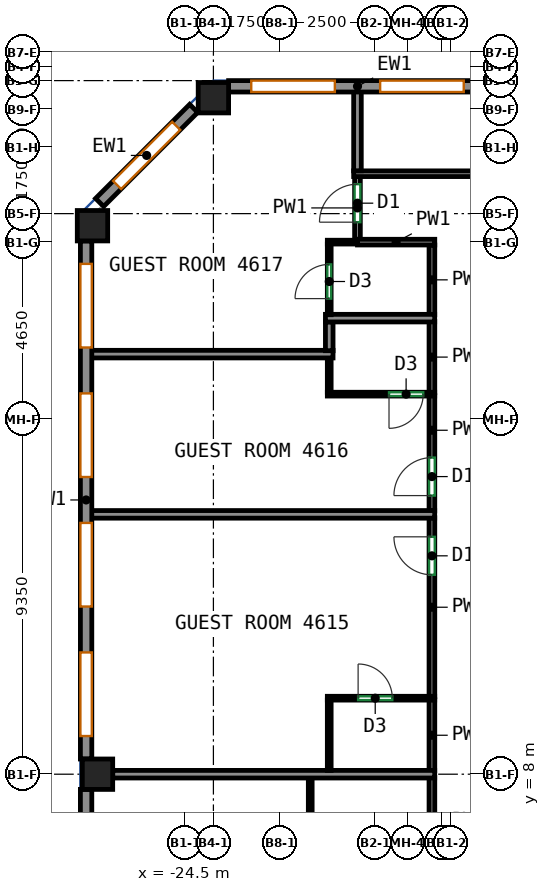
"""IFC4 building model, lengths in metres.
Left out: names, types, materials, properties, quantities, classifications, styles, units other than length and angle.
Written with IfcOpenShell. Run it as: python <this file> out.ifc"""

import sys

from ifc_helpers import new_model, si_unit, direction, frame, frame_2d, origin, origin_2d, place, context, subcontext, project, spatial, rectangle, extrude, source, transform, mapped, element, fill, save


model = new_model("IFC4")
c1 = context("Model", 3, precision=1e-05, world=origin(), true_north=direction((0.0, 1.0)))
c2 = subcontext(c1, "Body", "Model", "MODEL_VIEW")
j1 = project(units=[si_unit("LENGTHUNIT", "METRE"), si_unit("PLANEANGLEUNIT", "RADIAN")], contexts=[c1])
p1 = place(None, origin())
s1 = spatial("IfcSite", under=j1, at=p1, CompositionType="ELEMENT")
p2 = place(p1, origin())
s2 = spatial("IfcBuilding", under=s1, at=p2, CompositionType="ELEMENT")
p3 = place(p2, frame((0.0, 0.0, 192.3)))
s3 = spatial("IfcBuildingStorey", under=s2, at=p3, CompositionType="ELEMENT", Elevation=192.3)
m1 = source(origin(), c2, "Body", "SweptSolid", [
    extrude(rectangle(XDim=0.8, YDim=0.8, at=origin_2d()), origin(), (0.0, 0.0, 1.0), 3.0),
])
for number, where, z_axis, x_axis in (
    (1, (-26.932, 22.432, 0.0), (0.0, 0.0, 1.0), (1.0, 0.0, 0.0)),
    (2, (-26.8, 8.0, 0.0), (0.0, 0.0, 1.0), (1.0, 0.0, 0.0)),
    (3, (-23.75, 25.8, 0.0), (0.0, 0.0, 1.0), (1.0, 0.0, 0.0)),
):
    element("IfcColumn", number, at=place(p3, frame(where, z_axis=z_axis, x_axis=x_axis)), inside=s3, PredefinedType="COLUMN", context=c2, shape_type="MappedRepresentation", body=[
        mapped(m1, transform((0.0, 0.0, 0.0))),
    ])
m2 = source(origin(), c2, "Body", "SweptSolid", [
    extrude(rectangle(XDim=6.783, YDim=0.3, at=frame_2d((3.392, 0.0))), origin(), (0.0, 0.0, 1.0), 3.0),
])
p4 = place(p3, frame((-16.567, 26.1, 0.0), z_axis=(0.0, 0.0, 1.0), x_axis=(-1.0, 0.0, 0.0)))
e4 = element("IfcWall", 4, at=p4, inside=s3, PredefinedType="SOLIDWALL", context=c2, shape_type="MappedRepresentation", body=[
    mapped(m2, transform((0.0, 0.0, 0.0))),
])
p5 = place(p4, frame((0.596, 0.0, 0.85)))
e5 = element("IfcOpeningElement", 5, at=p5, cuts=e4, PredefinedType="OPENING", context=c2, shape_type="SweptSolid", body=[
    extrude(rectangle(XDim=2.2, YDim=1.95, at=frame_2d((1.1, 0.975))), frame((0.0, 0.16, 0.0), z_axis=(0.0, -1.0, 0.0), x_axis=(1.0, 0.0, 0.0)), (0.0, 0.0, 1.0), 0.32),
])
p6 = place(p4, frame((3.988, 0.0, 0.85)))
e6 = element("IfcOpeningElement", 6, at=p6, cuts=e4, PredefinedType="OPENING", context=c2, shape_type="SweptSolid", body=[
    extrude(rectangle(XDim=2.2, YDim=1.95, at=frame_2d((1.1, 0.975))), frame((0.0, 0.16, 0.0), z_axis=(0.0, -1.0, 0.0), x_axis=(1.0, 0.0, 0.0)), (0.0, 0.0, 1.0), 0.32),
])
m3 = source(origin(), c2, "Body", "SweptSolid", [
    extrude(rectangle(XDim=3.5, YDim=0.3, at=frame_2d((1.75, 0.0))), origin(), (0.0, 0.0, 1.0), 3.0),
])
p7 = place(p3, frame((-24.269, 25.519, 0.0), z_axis=(0.0, 0.0, 1.0), x_axis=(-0.707141656123, -0.70707190453, 0.0)))
e7 = element("IfcWall", 7, at=p7, inside=s3, PredefinedType="SOLIDWALL", context=c2, shape_type="MappedRepresentation", body=[
    mapped(m3, transform((0.0, 0.0, 0.0))),
])
p8 = place(p7, frame((0.65, 0.0, 0.85)))
e8 = element("IfcOpeningElement", 8, at=p8, cuts=e7, PredefinedType="OPENING", context=c2, shape_type="SweptSolid", body=[
    extrude(rectangle(XDim=2.2, YDim=1.95, at=frame_2d((1.1, 0.975))), frame((0.0, 0.16, 0.0), z_axis=(0.0, -1.0, 0.0), x_axis=(1.0, 0.0, 0.0)), (0.0, 0.0, 1.0), 0.32),
])
m4 = source(origin(), c2, "Body", "SweptSolid", [
    extrude(rectangle(XDim=13.632, YDim=0.3, at=frame_2d((6.816, 0.0))), origin(), (0.0, 0.0, 1.0), 3.0),
])
p9 = place(p3, frame((-27.1, 22.032, 0.0), z_axis=(0.0, 0.0, 1.0), x_axis=(0.0, -1.0, 0.0)))
e9 = element("IfcWall", 9, at=p9, inside=s3, PredefinedType="SOLIDWALL", context=c2, shape_type="MappedRepresentation", body=[
    mapped(m4, transform((0.0, 0.0, 0.0))),
])
p10 = place(p9, frame((0.604, 0.0, 0.85)))
e10 = element("IfcOpeningElement", 10, at=p10, cuts=e9, PredefinedType="OPENING", context=c2, shape_type="SweptSolid", body=[
    extrude(rectangle(XDim=2.2, YDim=1.95, at=frame_2d((1.1, 0.975))), frame((0.0, 0.16, 0.0), z_axis=(0.0, -1.0, 0.0), x_axis=(1.0, 0.0, 0.0)), (0.0, 0.0, 1.0), 0.32),
])
p11 = place(p9, frame((4.012, 0.0, 0.85)))
e11 = element("IfcOpeningElement", 11, at=p11, cuts=e9, PredefinedType="OPENING", context=c2, shape_type="SweptSolid", body=[
    extrude(rectangle(XDim=2.2, YDim=1.95, at=frame_2d((1.1, 0.975))), frame((0.0, 0.16, 0.0), z_axis=(0.0, -1.0, 0.0), x_axis=(1.0, 0.0, 0.0)), (0.0, 0.0, 1.0), 0.32),
])
p12 = place(p9, frame((7.42, 0.0, 0.85)))
e12 = element("IfcOpeningElement", 12, at=p12, cuts=e9, PredefinedType="OPENING", context=c2, shape_type="SweptSolid", body=[
    extrude(rectangle(XDim=2.2, YDim=1.95, at=frame_2d((1.1, 0.975))), frame((0.0, 0.16, 0.0), z_axis=(0.0, -1.0, 0.0), x_axis=(1.0, 0.0, 0.0)), (0.0, 0.0, 1.0), 0.32),
])
p13 = place(p9, frame((10.828, 0.0, 0.85)))
e13 = element("IfcOpeningElement", 13, at=p13, cuts=e9, PredefinedType="OPENING", context=c2, shape_type="SweptSolid", body=[
    extrude(rectangle(XDim=2.2, YDim=1.95, at=frame_2d((1.1, 0.975))), frame((0.0, 0.16, 0.0), z_axis=(0.0, -1.0, 0.0), x_axis=(1.0, 0.0, 0.0)), (0.0, 0.0, 1.0), 0.32),
])
m5 = source(origin(), c2, "Body", "SweptSolid", [
    extrude(rectangle(XDim=7.763, YDim=0.3, at=frame_2d((3.881, 0.0))), origin(), (0.0, 0.0, 1.0), 3.0),
])
p14 = place(p3, frame((-27.1, 7.6, 0.0), z_axis=(0.0, 0.0, 1.0), x_axis=(0.0, -1.0, 0.0)))
e14 = element("IfcWall", 14, at=p14, inside=s3, PredefinedType="SOLIDWALL", context=c2, shape_type="MappedRepresentation", body=[
    mapped(m5, transform((0.0, 0.0, 0.0))),
])
p15 = place(p14, frame((0.841, 0.0, 0.85)))
e15 = element("IfcOpeningElement", 15, at=p15, cuts=e14, PredefinedType="OPENING", context=c2, shape_type="SweptSolid", body=[
    extrude(rectangle(XDim=2.2, YDim=1.95, at=frame_2d((1.1, 0.975))), frame((0.0, 0.16, 0.0), z_axis=(0.0, -1.0, 0.0), x_axis=(1.0, 0.0, 0.0)), (0.0, 0.0, 1.0), 0.32),
])
p16 = place(p14, frame((4.722, 0.0, 0.85)))
e16 = element("IfcOpeningElement", 16, at=p16, cuts=e14, PredefinedType="OPENING", context=c2, shape_type="SweptSolid", body=[
    extrude(rectangle(XDim=2.2, YDim=1.95, at=frame_2d((1.1, 0.975))), frame((0.0, 0.16, 0.0), z_axis=(0.0, -1.0, 0.0), x_axis=(1.0, 0.0, 0.0)), (0.0, 0.0, 1.0), 0.32),
])
p17 = place(p3, frame((-18.0, 5.64, 0.0), z_axis=(0.0, 0.0, 1.0), x_axis=(0.0, 1.0, 0.0)))
e17 = element("IfcWall", 17, at=p17, inside=s3, PredefinedType="PARTITIONING", context=c2, shape_type="SweptSolid", body=[
    extrude(rectangle(XDim=2.27, YDim=0.15, at=frame_2d((1.135, 0.0))), origin(), (0.0, 0.0, 1.0), 3.0),
])
p18 = place(p3, frame((-18.0, 10.04, 0.0), z_axis=(0.0, 0.0, 1.0), x_axis=(0.0, 1.0, 0.0)))
e18 = element("IfcWall", 18, at=p18, inside=s3, PredefinedType="PARTITIONING", context=c2, shape_type="SweptSolid", body=[
    extrude(rectangle(XDim=4.707, YDim=0.15, at=frame_2d((2.354, 0.0))), origin(), (0.0, 0.0, 1.0), 3.0),
])
p19 = place(p18, frame((3.206, 0.0, 0.0)))
e19 = element("IfcOpeningElement", 19, at=p19, cuts=e18, PredefinedType="OPENING", context=c2, shape_type="SweptSolid", body=[
    extrude(rectangle(XDim=1.0, YDim=2.1, at=frame_2d((0.5, 1.05))), frame((0.0, 0.085, 0.0), z_axis=(0.0, -1.0, 0.0), x_axis=(1.0, 0.0, 0.0)), (0.0, 0.0, 1.0), 0.17),
])
p20 = place(p3, frame((-18.0, 8.09, 0.0), z_axis=(0.0, 0.0, 1.0), x_axis=(0.0, 1.0, 0.0)))
e20 = element("IfcWall", 20, at=p20, inside=s3, PredefinedType="PARTITIONING", context=c2, shape_type="SweptSolid", body=[
    extrude(rectangle(XDim=1.87, YDim=0.15, at=frame_2d((0.935, 0.0))), origin(), (0.0, 0.0, 1.0), 3.0),
])
p21 = place(p3, frame((-18.0, 14.927, 0.0), z_axis=(0.0, 0.0, 1.0), x_axis=(0.0, 1.0, 0.0)))
e21 = element("IfcWall", 21, at=p21, inside=s3, PredefinedType="PARTITIONING", context=c2, shape_type="SweptSolid", body=[
    extrude(rectangle(XDim=3.033, YDim=0.15, at=frame_2d((1.517, 0.0))), origin(), (0.0, 0.0, 1.0), 3.0),
])
p22 = place(p21, frame((0.404, 0.0, 0.0)))
e22 = element("IfcOpeningElement", 22, at=p22, cuts=e21, PredefinedType="OPENING", context=c2, shape_type="SweptSolid", body=[
    extrude(rectangle(XDim=1.0, YDim=2.1, at=frame_2d((0.5, 1.05))), frame((0.0, 0.085, 0.0), z_axis=(0.0, -1.0, 0.0), x_axis=(1.0, 0.0, 0.0)), (0.0, 0.0, 1.0), 0.17),
])
p23 = place(p3, frame((-18.0, 18.04, 0.0), z_axis=(0.0, 0.0, 1.0), x_axis=(0.0, 1.0, 0.0)))
e23 = element("IfcWall", 23, at=p23, inside=s3, PredefinedType="PARTITIONING", context=c2, shape_type="SweptSolid", body=[
    extrude(rectangle(XDim=1.87, YDim=0.15, at=frame_2d((0.935, 0.0))), origin(), (0.0, 0.0, 1.0), 3.0),
])
p24 = place(p3, frame((-19.959, 22.075, 0.0), z_axis=(0.0, 0.0, 1.0), x_axis=(0.0, 1.0, 0.0)))
e24 = element("IfcWall", 24, at=p24, inside=s3, PredefinedType="PARTITIONING", context=c2, shape_type="SweptSolid", body=[
    extrude(rectangle(XDim=1.65, YDim=0.15, at=frame_2d((0.825, 0.0))), origin(), (0.0, 0.0, 1.0), 3.0),
])
p25 = place(p24, frame((0.45, 0.0, 0.0)))
e25 = element("IfcOpeningElement", 25, at=p25, cuts=e24, PredefinedType="OPENING", context=c2, shape_type="SweptSolid", body=[
    extrude(rectangle(XDim=1.0, YDim=2.1, at=frame_2d((0.5, 1.05))), frame((0.0, 0.085, 0.0), z_axis=(0.0, -1.0, 0.0), x_axis=(1.0, 0.0, 0.0)), (0.0, 0.0, 1.0), 0.17),
])
p26 = place(p3, frame((-18.0, 20.09, 0.0), z_axis=(0.0, 0.0, 1.0), x_axis=(0.0, 1.0, 0.0)))
e26 = element("IfcWall", 26, at=p26, inside=s3, PredefinedType="PARTITIONING", context=c2, shape_type="SweptSolid", body=[
    extrude(rectangle(XDim=1.835, YDim=0.15, at=frame_2d((0.917, 0.0))), origin(), (0.0, 0.0, 1.0), 3.0),
])
p27 = place(p3, frame((-19.959, 22.0, 0.0), z_axis=(0.0, 0.0, 1.0), x_axis=(1.0, 0.0, 0.0)))
e27 = element("IfcWall", 27, at=p27, inside=s3, PredefinedType="PARTITIONING", context=c2, shape_type="SweptSolid", body=[
    extrude(rectangle(XDim=2.034, YDim=0.15, at=frame_2d((1.017, 0.0))), origin(), (0.0, 0.0, 1.0), 3.0),
])
p28 = place(p3, frame((-20.059, 23.8, 0.0), z_axis=(0.0, 0.0, 1.0), x_axis=(1.0, 0.0, 0.0)))
e28 = element("IfcWall", 28, at=p28, inside=s3, PredefinedType="PARTITIONING", context=c2, shape_type="SweptSolid", body=[
    extrude(rectangle(XDim=41.909, YDim=0.15, at=frame_2d((20.955, 0.0))), origin(), (0.0, 0.0, 1.0), 3.0),
])
p29 = place(p28, frame((4.718, 0.0, 0.0)))
e29 = element("IfcOpeningElement", 29, at=p29, cuts=e28, PredefinedType="OPENING", context=c2, shape_type="SweptSolid", body=[
    extrude(rectangle(XDim=0.9, YDim=2.1, at=frame_2d((0.45, 1.05))), frame((0.0, 0.085, 0.0), z_axis=(0.0, -1.0, 0.0), x_axis=(1.0, 0.0, 0.0)), (0.0, 0.0, 1.0), 0.17),
])
p30 = place(p28, frame((30.079, 0.0, 0.0)))
e30 = element("IfcOpeningElement", 30, at=p30, cuts=e28, PredefinedType="OPENING", context=c2, shape_type="SweptSolid", body=[
    extrude(rectangle(XDim=1.0, YDim=2.1, at=frame_2d((0.5, 1.05))), frame((0.0, 0.085, 0.0), z_axis=(0.0, -1.0, 0.0), x_axis=(1.0, 0.0, 0.0)), (0.0, 0.0, 1.0), 0.17),
])
p31 = place(p3, frame((-21.202, 5.65, 0.0), z_axis=(0.0, 0.0, 1.0), x_axis=(0.0, 1.0, 0.0)))
e31 = element("IfcWall", 31, at=p31, inside=s3, PredefinedType="PARTITIONING", context=c2, shape_type="SweptSolid", body=[
    extrude(rectangle(XDim=2.25, YDim=0.1, at=frame_2d((1.125, 0.0))), origin(), (0.0, 0.0, 1.0), 3.0),
])
p32 = place(p3, frame((-26.4, 8.0, 0.0), z_axis=(0.0, 0.0, 1.0), x_axis=(1.0, 0.0, 0.0)))
e32 = element("IfcWall", 32, at=p32, inside=s3, PredefinedType="PARTITIONING", context=c2, shape_type="SweptSolid", body=[
    extrude(rectangle(XDim=8.473, YDim=0.2, at=frame_2d((4.236, 0.0))), origin(), (0.0, 0.0, 1.0), 3.0),
])
p33 = place(p3, frame((-20.752, 10.0, 0.0), z_axis=(0.0, 0.0, 1.0), x_axis=(1.0, 0.0, 0.0)))
e33 = element("IfcWall", 33, at=p33, inside=s3, PredefinedType="PARTITIONING", context=c2, shape_type="SweptSolid", body=[
    extrude(rectangle(XDim=2.825, YDim=0.1, at=frame_2d((1.413, 0.0))), origin(), (0.0, 0.0, 1.0), 3.0),
])
p34 = place(p33, frame((0.81, 0.0, 0.0)))
e34 = element("IfcOpeningElement", 34, at=p34, cuts=e33, PredefinedType="OPENING", context=c2, shape_type="SweptSolid", body=[
    extrude(rectangle(XDim=0.9, YDim=2.1, at=frame_2d((0.45, 1.05))), frame((0.0, 0.06, 0.0), z_axis=(0.0, -1.0, 0.0), x_axis=(1.0, 0.0, 0.0)), (0.0, 0.0, 1.0), 0.12),
])
p35 = place(p3, frame((-20.702, 8.1, 0.0), z_axis=(0.0, 0.0, 1.0), x_axis=(0.0, 1.0, 0.0)))
e35 = element("IfcWall", 35, at=p35, inside=s3, PredefinedType="PARTITIONING", context=c2, shape_type="SweptSolid", body=[
    extrude(rectangle(XDim=1.85, YDim=0.1, at=frame_2d((0.925, 0.0))), origin(), (0.0, 0.0, 1.0), 3.0),
])
p36 = place(p3, frame((-17.927, 14.837, 0.0), z_axis=(0.0, 0.0, 1.0), x_axis=(-1.0, 0.0, 0.0)))
e36 = element("IfcWall", 36, at=p36, inside=s3, PredefinedType="PARTITIONING", context=c2, shape_type="SweptSolid", body=[
    extrude(rectangle(XDim=9.073, YDim=0.2, at=frame_2d((4.537, 0.0))), origin(), (0.0, 0.0, 1.0), 3.0),
])
p37 = place(p3, frame((-17.927, 18.0, 0.0), z_axis=(0.0, 0.0, 1.0), x_axis=(-1.0, 0.0, 0.0)))
e37 = element("IfcWall", 37, at=p37, inside=s3, PredefinedType="PARTITIONING", context=c2, shape_type="SweptSolid", body=[
    extrude(rectangle(XDim=2.825, YDim=0.1, at=frame_2d((1.413, 0.0))), origin(), (0.0, 0.0, 1.0), 3.0),
])
p38 = place(p37, frame((0.302, 0.0, 0.0)))
e38 = element("IfcOpeningElement", 38, at=p38, cuts=e37, PredefinedType="OPENING", context=c2, shape_type="SweptSolid", body=[
    extrude(rectangle(XDim=0.9, YDim=2.1, at=frame_2d((0.45, 1.05))), frame((0.0, 0.06, 0.0), z_axis=(0.0, -1.0, 0.0), x_axis=(1.0, 0.0, 0.0)), (0.0, 0.0, 1.0), 0.12),
])
p39 = place(p3, frame((-20.702, 18.05, 0.0), z_axis=(0.0, 0.0, 1.0), x_axis=(0.0, 1.0, 0.0)))
e39 = element("IfcWall", 39, at=p39, inside=s3, PredefinedType="PARTITIONING", context=c2, shape_type="SweptSolid", body=[
    extrude(rectangle(XDim=0.903, YDim=0.1, at=frame_2d((0.451, 0.0))), origin(), (0.0, 0.0, 1.0), 3.0),
])
p40 = place(p3, frame((-20.602, 19.053, 0.0), z_axis=(0.0, 0.0, 1.0), x_axis=(-1.0, 0.0, 0.0)))
e40 = element("IfcWall", 40, at=p40, inside=s3, PredefinedType="PARTITIONING", context=c2, shape_type="SweptSolid", body=[
    extrude(rectangle(XDim=6.398, YDim=0.2, at=frame_2d((3.199, 0.0))), origin(), (0.0, 0.0, 1.0), 3.0),
])
p41 = place(p3, frame((-20.702, 19.9, 0.0), z_axis=(0.0, 0.0, 1.0), x_axis=(0.0, -1.0, 0.0)))
e41 = element("IfcWall", 41, at=p41, inside=s3, PredefinedType="PARTITIONING", context=c2, shape_type="SweptSolid", body=[
    extrude(rectangle(XDim=0.757, YDim=0.2, at=frame_2d((0.378, 0.0))), origin(), (0.0, 0.0, 1.0), 3.0),
])
p42 = place(p3, frame((-17.927, 20.0, 0.0), z_axis=(0.0, 0.0, 1.0), x_axis=(-1.0, 0.0, 0.0)))
e42 = element("IfcWall", 42, at=p42, inside=s3, PredefinedType="PARTITIONING", context=c2, shape_type="SweptSolid", body=[
    extrude(rectangle(XDim=2.875, YDim=0.2, at=frame_2d((1.438, 0.0))), origin(), (0.0, 0.0, 1.0), 3.0),
])
p43 = place(p3, frame((-20.752, 22.0, 0.0), z_axis=(0.0, 0.0, 1.0), x_axis=(1.0, 0.0, 0.0)))
e43 = element("IfcWall", 43, at=p43, inside=s3, PredefinedType="PARTITIONING", context=c2, shape_type="SweptSolid", body=[
    extrude(rectangle(XDim=0.791, YDim=0.1, at=frame_2d((0.396, 0.0))), origin(), (0.0, 0.0, 1.0), 3.0),
])
p44 = place(p3, frame((-20.702, 20.09, 0.0), z_axis=(0.0, 0.0, 1.0), x_axis=(0.0, 1.0, 0.0)))
e44 = element("IfcWall", 44, at=p44, inside=s3, PredefinedType="PARTITIONING", context=c2, shape_type="SweptSolid", body=[
    extrude(rectangle(XDim=1.86, YDim=0.1, at=frame_2d((0.93, 0.0))), origin(), (0.0, 0.0, 1.0), 3.0),
])
p45 = place(p44, frame((0.424, 0.0, 0.0)))
e45 = element("IfcOpeningElement", 45, at=p45, cuts=e44, PredefinedType="OPENING", context=c2, shape_type="SweptSolid", body=[
    extrude(rectangle(XDim=0.9, YDim=2.1, at=frame_2d((0.45, 1.05))), frame((0.0, 0.06, 0.0), z_axis=(0.0, -1.0, 0.0), x_axis=(1.0, 0.0, 0.0)), (0.0, 0.0, 1.0), 0.12),
])
p46 = place(p3, frame((-19.959, 23.877, 0.0), z_axis=(0.0, 0.0, 1.0), x_axis=(0.0, 1.0, 0.0)))
e46 = element("IfcWall", 46, at=p46, inside=s3, PredefinedType="PARTITIONING", context=c2, shape_type="SweptSolid", body=[
    extrude(rectangle(XDim=2.123, YDim=0.2, at=frame_2d((1.062, 0.0))), origin(), (0.0, 0.0, 1.0), 3.0),
])
p47 = place(p5, origin())
e47 = element("IfcWindow", 47, at=p47, inside=s3, PartitioningType="SINGLE_PANEL", PredefinedType="WINDOW", context=c2, shape_type="SweptSolid", body=[
    extrude(rectangle(XDim=2.2, YDim=1.95, at=frame_2d((1.1, 0.975))), frame((0.0, 0.03, 0.0), z_axis=(0.0, -1.0, 0.0), x_axis=(1.0, 0.0, 0.0)), (0.0, 0.0, 1.0), 0.06),
])
fill(e5, e47)
p48 = place(p6, origin())
e48 = element("IfcWindow", 48, at=p48, inside=s3, PartitioningType="SINGLE_PANEL", PredefinedType="WINDOW", context=c2, shape_type="SweptSolid", body=[
    extrude(rectangle(XDim=2.2, YDim=1.95, at=frame_2d((1.1, 0.975))), frame((0.0, 0.03, 0.0), z_axis=(0.0, -1.0, 0.0), x_axis=(1.0, 0.0, 0.0)), (0.0, 0.0, 1.0), 0.06),
])
fill(e6, e48)
p49 = place(p8, origin())
e49 = element("IfcWindow", 49, at=p49, inside=s3, PartitioningType="SINGLE_PANEL", PredefinedType="WINDOW", context=c2, shape_type="SweptSolid", body=[
    extrude(rectangle(XDim=2.2, YDim=1.95, at=frame_2d((1.1, 0.975))), frame((0.0, 0.03, 0.0), z_axis=(0.0, -1.0, 0.0), x_axis=(1.0, 0.0, 0.0)), (0.0, 0.0, 1.0), 0.06),
])
fill(e8, e49)
p50 = place(p10, origin())
e50 = element("IfcWindow", 50, at=p50, inside=s3, PartitioningType="SINGLE_PANEL", PredefinedType="WINDOW", context=c2, shape_type="SweptSolid", body=[
    extrude(rectangle(XDim=2.2, YDim=1.95, at=frame_2d((1.1, 0.975))), frame((0.0, 0.03, 0.0), z_axis=(0.0, -1.0, 0.0), x_axis=(1.0, 0.0, 0.0)), (0.0, 0.0, 1.0), 0.06),
])
fill(e10, e50)
p51 = place(p11, origin())
e51 = element("IfcWindow", 51, at=p51, inside=s3, PartitioningType="SINGLE_PANEL", PredefinedType="WINDOW", context=c2, shape_type="SweptSolid", body=[
    extrude(rectangle(XDim=2.2, YDim=1.95, at=frame_2d((1.1, 0.975))), frame((0.0, 0.03, 0.0), z_axis=(0.0, -1.0, 0.0), x_axis=(1.0, 0.0, 0.0)), (0.0, 0.0, 1.0), 0.06),
])
fill(e11, e51)
p52 = place(p12, origin())
e52 = element("IfcWindow", 52, at=p52, inside=s3, PartitioningType="SINGLE_PANEL", PredefinedType="WINDOW", context=c2, shape_type="SweptSolid", body=[
    extrude(rectangle(XDim=2.2, YDim=1.95, at=frame_2d((1.1, 0.975))), frame((0.0, 0.03, 0.0), z_axis=(0.0, -1.0, 0.0), x_axis=(1.0, 0.0, 0.0)), (0.0, 0.0, 1.0), 0.06),
])
fill(e12, e52)
p53 = place(p13, origin())
e53 = element("IfcWindow", 53, at=p53, inside=s3, PartitioningType="SINGLE_PANEL", PredefinedType="WINDOW", context=c2, shape_type="SweptSolid", body=[
    extrude(rectangle(XDim=2.2, YDim=1.95, at=frame_2d((1.1, 0.975))), frame((0.0, 0.03, 0.0), z_axis=(0.0, -1.0, 0.0), x_axis=(1.0, 0.0, 0.0)), (0.0, 0.0, 1.0), 0.06),
])
fill(e13, e53)
p54 = place(p34, origin())
e54 = element("IfcDoor", 54, at=p54, inside=s3, OperationType="SINGLE_SWING_LEFT", PredefinedType="DOOR", context=c2, shape_type="SweptSolid", body=[
    extrude(rectangle(XDim=0.9, YDim=2.1, at=frame_2d((0.45, 1.05))), frame((0.0, 0.025, 0.0), z_axis=(0.0, -1.0, 0.0), x_axis=(1.0, 0.0, 0.0)), (0.0, 0.0, 1.0), 0.05),
])
fill(e34, e54)
p55 = place(p19, origin())
e55 = element("IfcDoor", 55, at=p55, inside=s3, OperationType="SINGLE_SWING_RIGHT", PredefinedType="DOOR", context=c2, shape_type="SweptSolid", body=[
    extrude(rectangle(XDim=1.0, YDim=2.1, at=frame_2d((0.5, 1.05))), frame((0.0, 0.025, 0.0), z_axis=(0.0, -1.0, 0.0), x_axis=(1.0, 0.0, 0.0)), (0.0, 0.0, 1.0), 0.05),
])
fill(e19, e55)
p56 = place(p22, origin())
e56 = element("IfcDoor", 56, at=p56, inside=s3, OperationType="SINGLE_SWING_LEFT", PredefinedType="DOOR", context=c2, shape_type="SweptSolid", body=[
    extrude(rectangle(XDim=1.0, YDim=2.1, at=frame_2d((0.5, 1.05))), frame((0.0, 0.025, 0.0), z_axis=(0.0, -1.0, 0.0), x_axis=(1.0, 0.0, 0.0)), (0.0, 0.0, 1.0), 0.05),
])
fill(e22, e56)
p57 = place(p38, origin())
e57 = element("IfcDoor", 57, at=p57, inside=s3, OperationType="SINGLE_SWING_RIGHT", PredefinedType="DOOR", context=c2, shape_type="SweptSolid", body=[
    extrude(rectangle(XDim=0.9, YDim=2.1, at=frame_2d((0.45, 1.05))), frame((0.0, 0.025, 0.0), z_axis=(0.0, -1.0, 0.0), x_axis=(1.0, 0.0, 0.0)), (0.0, 0.0, 1.0), 0.05),
])
fill(e38, e57)
p58 = place(p45, origin())
e58 = element("IfcDoor", 58, at=p58, inside=s3, OperationType="SINGLE_SWING_LEFT", PredefinedType="DOOR", context=c2, shape_type="SweptSolid", body=[
    extrude(rectangle(XDim=0.9, YDim=2.1, at=frame_2d((0.45, 1.05))), frame((0.0, 0.025, 0.0), z_axis=(0.0, -1.0, 0.0), x_axis=(1.0, 0.0, 0.0)), (0.0, 0.0, 1.0), 0.05),
])
fill(e45, e58)
p59 = place(p25, origin())
e59 = element("IfcDoor", 59, at=p59, inside=s3, OperationType="SINGLE_SWING_LEFT", PredefinedType="DOOR", context=c2, shape_type="SweptSolid", body=[
    extrude(rectangle(XDim=1.0, YDim=2.1, at=frame_2d((0.5, 1.05))), frame((0.0, 0.025, 0.0), z_axis=(0.0, -1.0, 0.0), x_axis=(1.0, 0.0, 0.0)), (0.0, 0.0, 1.0), 0.05),
])
fill(e25, e59)
save(model, sys.argv[1])
